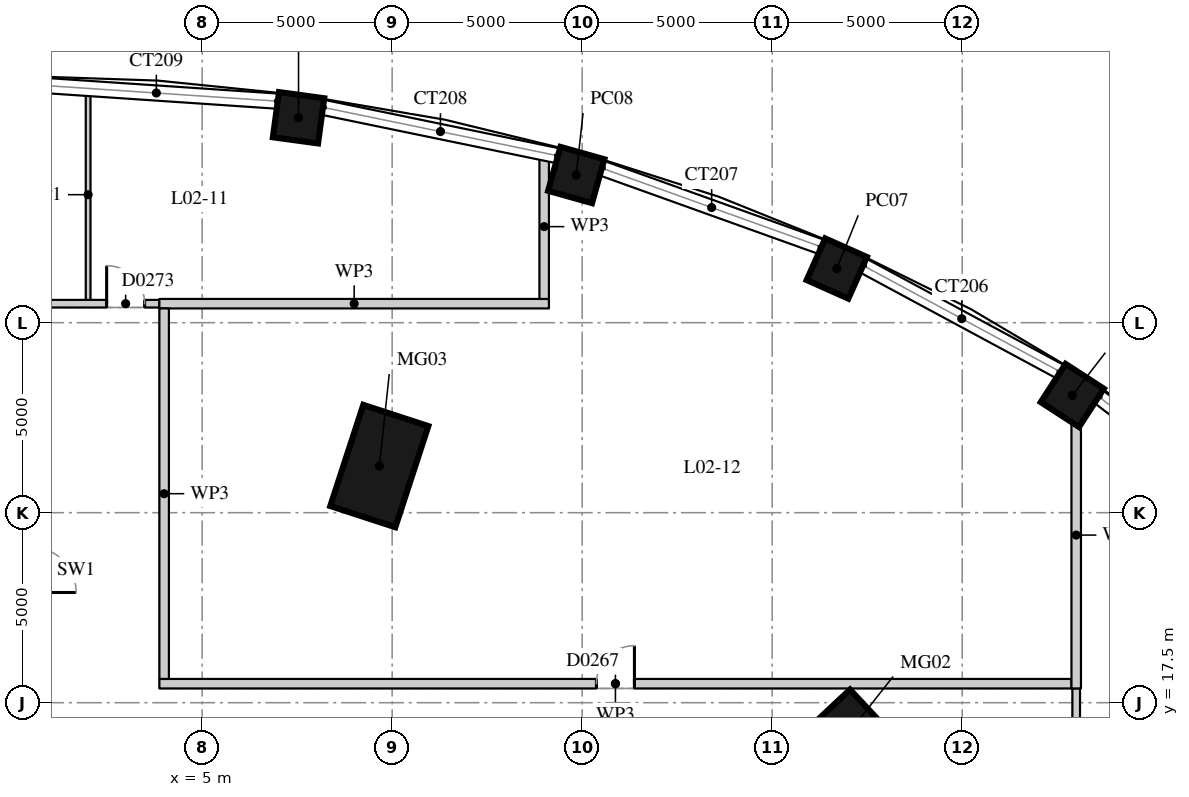
"""IFC4 building model, lengths in metres.
Left out: names, types, materials, properties, quantities, classifications, styles, units other than length and angle.
Written with IfcOpenShell. Run it as: python <this file> out.ifc"""

import sys

from ifc_helpers import new_model, si_unit, direction, frame, frame_2d, origin, origin_2d, place, context, subcontext, project, spatial, rectangle, extrude, element, fill, save


model = new_model("IFC4")
c1 = context("Model", 3, precision=1e-05, world=origin(), true_north=direction((0.0, 1.0)))
c2 = subcontext(c1, "Body", "Model", "MODEL_VIEW")
j1 = project(units=[si_unit("LENGTHUNIT", "METRE"), si_unit("PLANEANGLEUNIT", "RADIAN")], contexts=[c1])
p1 = place(None, origin())
s1 = spatial("IfcSite", under=j1, at=p1, CompositionType="ELEMENT")
p2 = place(p1, origin())
s2 = spatial("IfcBuilding", under=s1, at=p2, CompositionType="ELEMENT")
p3 = place(p2, frame((0.0, 0.0, 12.5)))
s3 = spatial("IfcBuildingStorey", under=s2, at=p3, CompositionType="ELEMENT", Elevation=12.5)
for number, where, z_axis, x_axis in (
    (1, (21.641, 16.23, 0.0), (0.0, 0.0, 1.0), (0.73, 0.683, 0.0)),
    (2, (9.662, 23.727, 0.0), (0.0, 0.0, 1.0), (0.31, 0.951, 0.0)),
):
    element("IfcColumn", number, at=place(p3, frame(where, z_axis=z_axis, x_axis=x_axis)), inside=s3, PredefinedType="COLUMN", context=c2, shape_type="SweptSolid", body=[
        extrude(rectangle(XDim=2.8, YDim=1.8, at=origin_2d()), origin(), (0.0, 0.0, 1.0), 5.0),
    ])
for number, where, z_axis, x_axis in (
    (3, (27.897, 25.586, 0.0), (0.0, 0.0, 1.0), (0.544, 0.839, 0.0)),
    (4, (21.7, 28.925, 0.0), (0.0, 0.0, 1.0), (0.407, 0.913, 0.0)),
    (5, (14.844, 31.386, 0.0), (0.0, 0.0, 1.0), (0.271, 0.963, 0.0)),
    (6, (7.536, 32.893, 0.0), (0.0, 0.0, 1.0), (0.135, 0.991, 0.0)),
):
    element("IfcColumn", number, at=place(p3, frame(where, z_axis=z_axis, x_axis=x_axis)), inside=s3, PredefinedType="COLUMN", context=c2, shape_type="SweptSolid", body=[
        extrude(rectangle(XDim=1.2, YDim=1.2, at=origin_2d()), origin(), (0.0, 0.0, 1.0), 5.0),
    ])
p4 = place(p3, frame((3.875, 18.0, 0.0), z_axis=(0.0, 0.0, 1.0), x_axis=(1.0, 0.0, 0.0)))
e7 = element("IfcWall", 7, at=p4, inside=s3, PredefinedType="PARTITIONING", context=c2, shape_type="SweptSolid", body=[
    extrude(rectangle(XDim=24.0, YDim=0.25, at=frame_2d((12.0, 0.0))), origin(), (0.0, 0.0, 1.0), 4.65),
])
p5 = place(p4, frame((11.5, 0.0, 0.0)))
e8 = element("IfcOpeningElement", 8, at=p5, cuts=e7, PredefinedType="OPENING", context=c2, shape_type="SweptSolid", body=[
    extrude(rectangle(XDim=1.0, YDim=2.1, at=frame_2d((0.5, 1.05))), frame((0.0, 0.135, 0.0), z_axis=(0.0, -1.0, 0.0), x_axis=(1.0, 0.0, 0.0)), (0.0, 0.0, 1.0), 0.27),
])
p6 = place(p3, frame((-9.6, 28.0, 0.0), z_axis=(0.0, 0.0, 1.0), x_axis=(1.0, 0.0, 0.0)))
e9 = element("IfcWall", 9, at=p6, inside=s3, PredefinedType="PARTITIONING", context=c2, shape_type="SweptSolid", body=[
    extrude(rectangle(XDim=13.475, YDim=0.2, at=frame_2d((6.738, 0.0))), origin(), (0.0, 0.0, 1.0), 4.65),
])
p7 = place(p6, frame((5.35, 0.0, 0.0)))
e10 = element("IfcOpeningElement", 10, at=p7, cuts=e9, PredefinedType="OPENING", context=c2, shape_type="SweptSolid", body=[
    extrude(rectangle(XDim=1.0, YDim=2.1, at=frame_2d((0.5, 1.05))), frame((0.0, 0.11, 0.0), z_axis=(0.0, -1.0, 0.0), x_axis=(1.0, 0.0, 0.0)), (0.0, 0.0, 1.0), 0.22),
])
p8 = place(p6, frame((12.087, 0.0, 0.0)))
e11 = element("IfcOpeningElement", 11, at=p8, cuts=e9, PredefinedType="OPENING", context=c2, shape_type="SweptSolid", body=[
    extrude(rectangle(XDim=1.0, YDim=2.1, at=frame_2d((0.5, 1.05))), frame((0.0, 0.11, 0.0), z_axis=(0.0, -1.0, 0.0), x_axis=(1.0, 0.0, 0.0)), (0.0, 0.0, 1.0), 0.22),
])
p9 = place(p3, frame((3.875, 28.0, 0.0), z_axis=(0.0, 0.0, 1.0), x_axis=(1.0, 0.0, 0.0)))
e12 = element("IfcWall", 12, at=p9, inside=s3, PredefinedType="PARTITIONING", context=c2, shape_type="SweptSolid", body=[
    extrude(rectangle(XDim=10.25, YDim=0.25, at=frame_2d((5.125, 0.0))), origin(), (0.0, 0.0, 1.0), 4.65),
])
p10 = place(p3, frame((2.0, 28.1, 0.0), z_axis=(0.0, 0.0, 1.0), x_axis=(0.0, 1.0, 0.0)))
e13 = element("IfcWall", 13, at=p10, inside=s3, PredefinedType="PARTITIONING", context=c2, shape_type="SweptSolid", body=[
    extrude(rectangle(XDim=5.537, YDim=0.125, at=frame_2d((2.769, 0.0))), origin(), (0.0, 0.0, 1.0), 4.65),
])
p11 = place(p3, frame((4.0, 18.125, 0.0), z_axis=(0.0, 0.0, 1.0), x_axis=(0.0, 1.0, 0.0)))
e14 = element("IfcWall", 14, at=p11, inside=s3, PredefinedType="PARTITIONING", context=c2, shape_type="SweptSolid", body=[
    extrude(rectangle(XDim=9.75, YDim=0.25, at=frame_2d((4.875, 0.0))), origin(), (0.0, 0.0, 1.0), 4.65),
])
p12 = place(p3, frame((14.0, 28.125, 0.0), z_axis=(0.0, 0.0, 1.0), x_axis=(0.0, 1.0, 0.0)))
e15 = element("IfcWall", 15, at=p12, inside=s3, PredefinedType="PARTITIONING", context=c2, shape_type="SweptSolid", body=[
    extrude(rectangle(XDim=3.806, YDim=0.25, at=frame_2d((1.903, 0.0))), origin(), (0.0, 0.0, 1.0), 4.65),
])
p13 = place(p3, frame((28.0, 12.1, 0.0), z_axis=(0.0, 0.0, 1.0), x_axis=(0.0, 1.0, 0.0)))
e16 = element("IfcWall", 16, at=p13, inside=s3, PredefinedType="PARTITIONING", context=c2, shape_type="SweptSolid", body=[
    extrude(rectangle(XDim=5.775, YDim=0.2, at=frame_2d((2.887, 0.0))), origin(), (0.0, 0.0, 1.0), 4.65),
])
p14 = place(p13, frame((2.388, 0.0, 0.0)))
e17 = element("IfcOpeningElement", 17, at=p14, cuts=e16, PredefinedType="OPENING", context=c2, shape_type="SweptSolid", body=[
    extrude(rectangle(XDim=1.0, YDim=2.1, at=frame_2d((0.5, 1.05))), frame((0.0, 0.11, 0.0), z_axis=(0.0, -1.0, 0.0), x_axis=(1.0, 0.0, 0.0)), (0.0, 0.0, 1.0), 0.22),
])
p15 = place(p3, frame((28.0, 17.875, 0.0), z_axis=(0.0, 0.0, 1.0), x_axis=(0.0, 1.0, 0.0)))
e18 = element("IfcWall", 18, at=p15, inside=s3, PredefinedType="PARTITIONING", context=c2, shape_type="SweptSolid", body=[
    extrude(rectangle(XDim=8.072, YDim=0.25, at=frame_2d((4.036, 0.0))), origin(), (0.0, 0.0, 1.0), 4.65),
])
p16 = place(p8, origin())
e19 = element("IfcDoor", 19, at=p16, inside=s3, OperationType="SINGLE_SWING_LEFT", PredefinedType="DOOR", context=c2, shape_type="SweptSolid", body=[
    extrude(rectangle(XDim=1.0, YDim=2.1, at=frame_2d((0.5, 1.05))), frame((0.0, 0.025, 0.0), z_axis=(0.0, -1.0, 0.0), x_axis=(1.0, 0.0, 0.0)), (0.0, 0.0, 1.0), 0.05),
])
fill(e11, e19)
p17 = place(p5, origin())
e20 = element("IfcDoor", 20, at=p17, inside=s3, OperationType="SINGLE_SWING_RIGHT", PredefinedType="DOOR", context=c2, shape_type="SweptSolid", body=[
    extrude(rectangle(XDim=1.0, YDim=2.1, at=frame_2d((0.5, 1.05))), frame((0.0, 0.025, 0.0), z_axis=(0.0, -1.0, 0.0), x_axis=(1.0, 0.0, 0.0)), (0.0, 0.0, 1.0), 0.05),
])
fill(e8, e20)
save(model, sys.argv[1])
